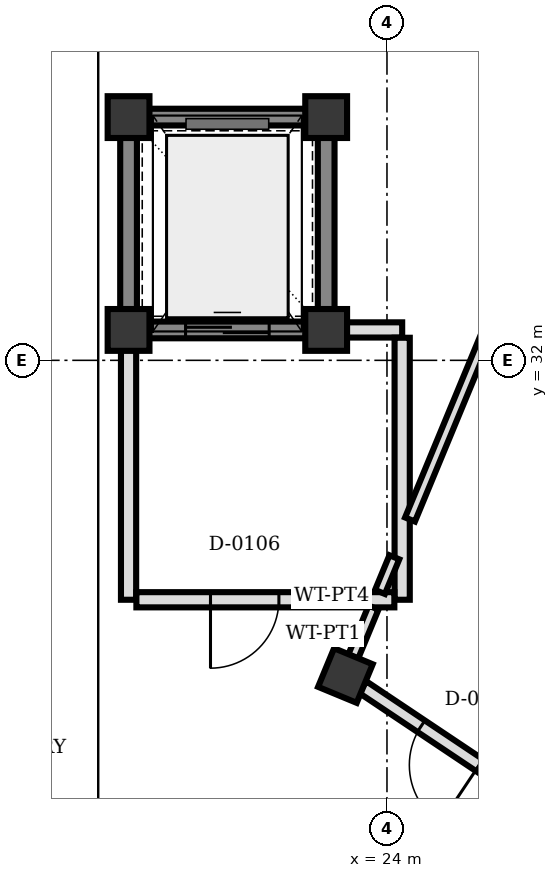
"""IFC4 building model, lengths in metres.
Left out: names, types, materials, properties, quantities, classifications, styles, units other than length and angle.
Written with IfcOpenShell. Run it as: python <this file> out.ifc"""

import sys

from ifc_helpers import new_model, si_unit, direction, frame, frame_2d, origin, origin_2d, place, context, subcontext, project, spatial, rectangle, extrude, element, fill, save


model = new_model("IFC4")
c1 = context("Model", 3, precision=1e-05, world=origin(), true_north=direction((0.0, 1.0)))
c2 = subcontext(c1, "Body", "Model", "MODEL_VIEW")
j1 = project(units=[si_unit("LENGTHUNIT", "METRE"), si_unit("PLANEANGLEUNIT", "RADIAN")], contexts=[c1])
p1 = place(None, origin())
s1 = spatial("IfcSite", under=j1, at=p1, CompositionType="ELEMENT")
p2 = place(p1, origin())
s2 = spatial("IfcBuilding", under=s1, at=p2, CompositionType="ELEMENT")
p3 = place(p2, frame((0.0, 0.0, 4.5)))
s3 = spatial("IfcBuildingStorey", under=s2, at=p3, CompositionType="ELEMENT", Elevation=4.5)
for number, where, z_axis, x_axis in (
    (1, (20.6, 32.4, 0.0), (0.0, 0.0, 1.0), (1.0, 0.0, 0.0)),
    (2, (23.2, 32.4, 0.0), (0.0, 0.0, 1.0), (1.0, 0.0, 0.0)),
    (3, (23.2, 35.2, 0.0), (0.0, 0.0, 1.0), (1.0, 0.0, 0.0)),
    (4, (20.6, 35.2, 0.0), (0.0, 0.0, 1.0), (1.0, 0.0, 0.0)),
    (5, (23.453, 27.853, 0.0), (0.0, 0.0, 1.0), (0.383, 0.924, 0.0)),
):
    element("IfcColumn", number, at=place(p3, frame(where, z_axis=z_axis, x_axis=x_axis)), inside=s3, PredefinedType="COLUMN", context=c2, shape_type="SweptSolid", body=[
        extrude(rectangle(XDim=0.55, YDim=0.55, at=origin_2d()), origin(), (0.0, 0.0, 1.0), 4.0),
    ])
p4 = place(p3, frame((20.867, 32.4, 0.0), z_axis=(0.0, 0.0, 1.0), x_axis=(1.0, 0.0, 0.0)))
e6 = element("IfcWall", 6, at=p4, inside=s3, PredefinedType="SHEAR", context=c2, shape_type="SweptSolid", body=[
    extrude(rectangle(XDim=2.066, YDim=0.22, at=frame_2d((1.033, 0.0))), origin(), (0.0, 0.0, 1.0), 3.74),
])
p5 = place(p4, frame((0.483, 0.0, 0.0)))
e7 = element("IfcOpeningElement", 7, at=p5, cuts=e6, PredefinedType="OPENING", context=c2, shape_type="SweptSolid", body=[
    extrude(rectangle(XDim=1.1, YDim=2.15, at=frame_2d((0.55, 1.075))), frame((0.0, 0.12, 0.0), z_axis=(0.0, -1.0, 0.0), x_axis=(1.0, 0.0, 0.0)), (0.0, 0.0, 1.0), 0.24),
])
p6 = place(p3, frame((23.2, 32.667, 0.0), z_axis=(0.0, 0.0, 1.0), x_axis=(0.0, 1.0, 0.0)))
e8 = element("IfcWall", 8, at=p6, inside=s3, PredefinedType="SHEAR", context=c2, shape_type="SweptSolid", body=[
    extrude(rectangle(XDim=2.266, YDim=0.22, at=frame_2d((1.133, 0.0))), origin(), (0.0, 0.0, 1.0), 3.74),
])
p7 = place(p3, frame((22.933, 35.2, 0.0), z_axis=(0.0, 0.0, 1.0), x_axis=(-1.0, 0.0, 0.0)))
e9 = element("IfcWall", 9, at=p7, inside=s3, PredefinedType="SHEAR", context=c2, shape_type="SweptSolid", body=[
    extrude(rectangle(XDim=2.066, YDim=0.22, at=frame_2d((1.033, 0.0))), origin(), (0.0, 0.0, 1.0), 3.74),
])
p8 = place(p3, frame((20.6, 34.933, 0.0), z_axis=(0.0, 0.0, 1.0), x_axis=(0.0, -1.0, 0.0)))
e10 = element("IfcWall", 10, at=p8, inside=s3, PredefinedType="SHEAR", context=c2, shape_type="SweptSolid", body=[
    extrude(rectangle(XDim=2.266, YDim=0.22, at=frame_2d((1.133, 0.0))), origin(), (0.0, 0.0, 1.0), 3.74),
])
p9 = place(p3, frame((23.467, 32.4, 0.0), z_axis=(0.0, 0.0, 1.0), x_axis=(1.0, 0.0, 0.0)))
e11 = element("IfcWall", 11, at=p9, inside=s3, PredefinedType="PARTITIONING", context=c2, shape_type="SweptSolid", body=[
    extrude(rectangle(XDim=0.733, YDim=0.2, at=frame_2d((0.366, 0.0))), origin(), (0.0, 0.0, 1.0), 3.7),
])
p10 = place(p3, frame((20.6, 28.85, 0.0), z_axis=(0.0, 0.0, 1.0), x_axis=(0.0, 1.0, 0.0)))
e12 = element("IfcWall", 12, at=p10, inside=s3, PredefinedType="PARTITIONING", context=c2, shape_type="SweptSolid", body=[
    extrude(rectangle(XDim=3.283, YDim=0.2, at=frame_2d((1.642, 0.0))), origin(), (0.0, 0.0, 1.0), 3.7),
])
p11 = place(p3, frame((24.2, 28.85, 0.0), z_axis=(0.0, 0.0, 1.0), x_axis=(0.0, 1.0, 0.0)))
e13 = element("IfcWall", 13, at=p11, inside=s3, PredefinedType="PARTITIONING", context=c2, shape_type="SweptSolid", body=[
    extrude(rectangle(XDim=3.447, YDim=0.2, at=frame_2d((1.724, 0.0))), origin(), (0.0, 0.0, 1.0), 3.072),
])
p12 = place(p3, frame((24.097, 28.85, 0.0), z_axis=(0.0, 0.0, 1.0), x_axis=(-1.0, 0.0, 0.0)))
e14 = element("IfcWall", 14, at=p12, inside=s3, PredefinedType="PARTITIONING", context=c2, shape_type="SweptSolid", body=[
    extrude(rectangle(XDim=3.394, YDim=0.2, at=frame_2d((1.697, 0.0))), origin(), (0.0, 0.0, 1.0), 3.072),
])
p13 = place(p12, frame((1.519, 0.0, 0.0)))
e15 = element("IfcOpeningElement", 15, at=p13, cuts=e14, PredefinedType="OPENING", context=c2, shape_type="SweptSolid", body=[
    extrude(rectangle(XDim=0.9, YDim=2.2, at=frame_2d((0.45, 1.1))), frame((0.0, 0.11, 0.0), z_axis=(0.0, -1.0, 0.0), x_axis=(1.0, 0.0, 0.0)), (0.0, 0.0, 1.0), 0.22),
])
p14 = place(p3, frame((23.555, 28.1, 0.0), z_axis=(0.0, 0.0, 1.0), x_axis=(0.38278283439, 0.923838352579, 0.0)))
e16 = element("IfcWall", 16, at=p14, inside=s3, PredefinedType="PARTITIONING", context=c2, shape_type="SweptSolid", body=[
    extrude(rectangle(XDim=0.7, YDim=0.14, at=frame_2d((0.35, 0.0))), origin(), (0.0, 0.0, 1.0), 3.072),
])
p15 = place(p3, frame((23.908, 28.953, 0.0), z_axis=(0.0, 0.0, 1.0), x_axis=(0.3827885685, 0.92383597669, 0.0)))
e17 = element("IfcWall", 17, at=p15, inside=s3, PredefinedType="PARTITIONING", context=c2, shape_type="SweptSolid", body=[
    extrude(rectangle(XDim=0.494, YDim=0.14, at=frame_2d((0.247, 0.0))), origin(), (0.0, 0.0, 1.0), 3.072),
])
p16 = place(p3, frame((24.303, 29.906, 0.0), z_axis=(0.0, 0.0, 1.0), x_axis=(0.382682035927, 0.923880110934, 0.0)))
e18 = element("IfcWall", 18, at=p16, inside=s3, PredefinedType="PARTITIONING", context=c2, shape_type="SweptSolid", body=[
    extrude(rectangle(XDim=6.486, YDim=0.14, at=frame_2d((3.243, 0.0))), origin(), (0.0, 0.0, 1.0), 3.072),
])
p17 = place(p3, frame((25.984, 26.161, 0.0), z_axis=(0.0, 0.0, 1.0), x_axis=(-0.831318045056, 0.555797002478, 0.0)))
e19 = element("IfcWall", 19, at=p17, inside=s3, PredefinedType="PARTITIONING", context=c2, shape_type="SweptSolid", body=[
    extrude(rectangle(XDim=2.773, YDim=0.18, at=frame_2d((1.386, 0.0))), origin(), (0.0, 0.0, 1.0), 3.072),
])
p18 = place(p17, frame((0.926, 0.0, 0.0)))
e20 = element("IfcOpeningElement", 20, at=p18, cuts=e19, PredefinedType="OPENING", context=c2, shape_type="SweptSolid", body=[
    extrude(rectangle(XDim=0.92, YDim=2.1, at=frame_2d((0.46, 1.05))), frame((0.0, 0.1, 0.0), z_axis=(0.0, -1.0, 0.0), x_axis=(1.0, 0.0, 0.0)), (0.0, 0.0, 1.0), 0.2),
])
p19 = place(p5, origin())
e21 = element("IfcDoor", 21, at=p19, inside=s3, OperationType="DOUBLE_DOOR_SLIDING", PredefinedType="DOOR", context=c2, shape_type="SweptSolid", body=[
    extrude(rectangle(XDim=1.1, YDim=2.15, at=frame_2d((0.55, 1.075))), frame((0.0, 0.025, 0.0), z_axis=(0.0, -1.0, 0.0), x_axis=(1.0, 0.0, 0.0)), (0.0, 0.0, 1.0), 0.05),
])
fill(e7, e21)
p20 = place(p13, origin())
e22 = element("IfcDoor", 22, at=p20, inside=s3, OperationType="SINGLE_SWING_RIGHT", PredefinedType="DOOR", context=c2, shape_type="SweptSolid", body=[
    extrude(rectangle(XDim=0.9, YDim=2.2, at=frame_2d((0.45, 1.1))), frame((0.0, 0.025, 0.0), z_axis=(0.0, -1.0, 0.0), x_axis=(1.0, 0.0, 0.0)), (0.0, 0.0, 1.0), 0.05),
])
fill(e15, e22)
p21 = place(p18, origin())
e23 = element("IfcDoor", 23, at=p21, inside=s3, OperationType="SINGLE_SWING_LEFT", PredefinedType="DOOR", context=c2, shape_type="SweptSolid", body=[
    extrude(rectangle(XDim=0.92, YDim=2.1, at=frame_2d((0.46, 1.05))), frame((0.0, 0.025, 0.0), z_axis=(0.0, -1.0, 0.0), x_axis=(1.0, 0.0, 0.0)), (0.0, 0.0, 1.0), 0.05),
])
fill(e20, e23)
save(model, sys.argv[1])
